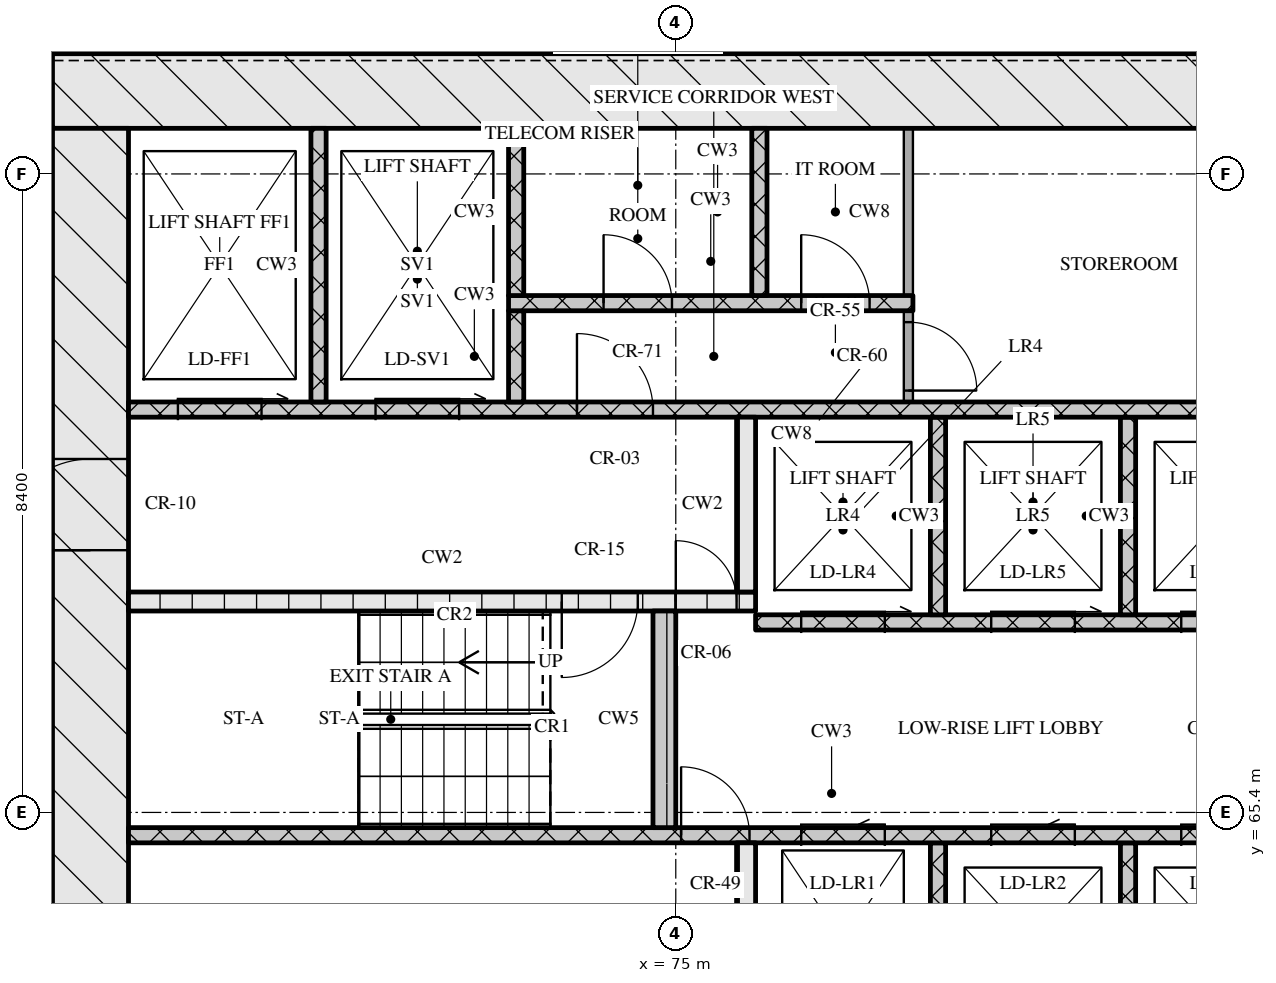
"""IFC4 building model, lengths in metres.
Left out: names, types, materials, properties, quantities, classifications, styles, units other than length and angle.
Written with IfcOpenShell. Run it as: python <this file> out.ifc"""

import sys

from ifc_helpers import new_model, si_unit, direction, frame, frame_2d, origin, place, context, subcontext, project, spatial, rectangle, extrude, element, fill, save


model = new_model("IFC4")
c1 = context("Model", 3, precision=1e-05, world=origin(), true_north=direction((0.0, 1.0)))
c2 = subcontext(c1, "Body", "Model", "MODEL_VIEW")
j1 = project(units=[si_unit("LENGTHUNIT", "METRE"), si_unit("PLANEANGLEUNIT", "RADIAN")], contexts=[c1])
p1 = place(None, origin())
s1 = spatial("IfcSite", under=j1, at=p1, CompositionType="ELEMENT")
p2 = place(p1, origin())
s2 = spatial("IfcBuilding", under=s1, at=p2, CompositionType="ELEMENT")
p3 = place(p2, frame((0.0, 0.0, 131.25)))
s3 = spatial("IfcBuildingStorey", under=s2, at=p3, CompositionType="ELEMENT", Elevation=131.25)
p4 = place(p3, frame((66.8, 74.9, 0.0), z_axis=(0.0, 0.0, 1.0), x_axis=(1.0, 0.0, 0.0)))
e1 = element("IfcWall", 1, at=p4, inside=s3, PredefinedType="SOLIDWALL", context=c2, shape_type="SweptSolid", body=[
    extrude(rectangle(XDim=41.6, YDim=1.0, at=frame_2d((20.8, 0.0))), origin(), (0.0, 0.0, 1.0), 3.32),
])
p5 = place(p3, frame((67.3, 62.4, 0.0), z_axis=(0.0, 0.0, 1.0), x_axis=(0.0, 1.0, 0.0)))
e2 = element("IfcWall", 2, at=p5, inside=s3, PredefinedType="SOLIDWALL", context=c2, shape_type="SweptSolid", body=[
    extrude(rectangle(XDim=12.0, YDim=1.0, at=frame_2d((6.0, 0.0))), origin(), (0.0, 0.0, 1.0), 3.32),
])
p6 = place(p5, frame((6.45, 0.0, 0.0)))
e3 = element("IfcOpeningElement", 3, at=p6, cuts=e2, PredefinedType="OPENING", context=c2, shape_type="SweptSolid", body=[
    extrude(rectangle(XDim=1.2, YDim=2.1, at=frame_2d((0.6, 1.05))), frame((0.0, 0.51, 0.0), z_axis=(0.0, -1.0, 0.0), x_axis=(1.0, 0.0, 0.0)), (0.0, 0.0, 1.0), 1.02),
])
p7 = place(p3, frame((75.925, 62.4, 0.0), z_axis=(0.0, 0.0, 1.0), x_axis=(0.0, 1.0, 0.0)))
e4 = element("IfcWall", 4, at=p7, inside=s3, PredefinedType="SOLIDWALL", context=c2, shape_type="SweptSolid", body=[
    extrude(rectangle(XDim=2.6, YDim=0.25, at=frame_2d((1.3, 0.0))), origin(), (0.0, 0.0, 1.0), 3.32),
])
for number, where, z_axis, x_axis in (
    (5, (78.45, 62.4, 0.0), (0.0, 0.0, 1.0), (0.0, 1.0, 0.0)),
    (6, (80.95, 62.4, 0.0), (0.0, 0.0, 1.0), (0.0, 1.0, 0.0)),
):
    element("IfcWall", number, at=place(p3, frame(where, z_axis=z_axis, x_axis=x_axis)), inside=s3, PredefinedType="SOLIDWALL", context=c2, shape_type="SweptSolid", body=[
        extrude(rectangle(XDim=2.6, YDim=0.2, at=frame_2d((1.3, 0.0))), origin(), (0.0, 0.0, 1.0), 3.32),
    ])
p8 = place(p3, frame((67.8, 65.1, 0.0), z_axis=(0.0, 0.0, 1.0), x_axis=(1.0, 0.0, 0.0)))
e7 = element("IfcWall", 7, at=p8, inside=s3, PredefinedType="SOLIDWALL", context=c2, shape_type="SweptSolid", body=[
    extrude(rectangle(XDim=18.5, YDim=0.2, at=frame_2d((9.25, 0.0))), origin(), (0.0, 0.0, 1.0), 3.32),
])
p9 = place(p8, frame((7.27, 0.0, 0.0)))
e8 = element("IfcOpeningElement", 8, at=p9, cuts=e7, PredefinedType="OPENING", context=c2, shape_type="SweptSolid", body=[
    extrude(rectangle(XDim=0.9, YDim=2.1, at=frame_2d((0.45, 1.05))), frame((0.0, 0.11, 0.0), z_axis=(0.0, -1.0, 0.0), x_axis=(1.0, 0.0, 0.0)), (0.0, 0.0, 1.0), 0.22),
])
p10 = place(p8, frame((8.85, 0.0, 0.0)))
e9 = element("IfcOpeningElement", 9, at=p10, cuts=e7, PredefinedType="OPENING", context=c2, shape_type="SweptSolid", body=[
    extrude(rectangle(XDim=1.1, YDim=2.1, at=frame_2d((0.55, 1.05))), frame((0.0, 0.11, 0.0), z_axis=(0.0, -1.0, 0.0), x_axis=(1.0, 0.0, 0.0)), (0.0, 0.0, 1.0), 0.22),
])
p11 = place(p8, frame((11.35, 0.0, 0.0)))
e10 = element("IfcOpeningElement", 10, at=p11, cuts=e7, PredefinedType="OPENING", context=c2, shape_type="SweptSolid", body=[
    extrude(rectangle(XDim=1.1, YDim=2.1, at=frame_2d((0.55, 1.05))), frame((0.0, 0.11, 0.0), z_axis=(0.0, -1.0, 0.0), x_axis=(1.0, 0.0, 0.0)), (0.0, 0.0, 1.0), 0.22),
])
p12 = place(p8, frame((13.85, 0.0, 0.0)))
e11 = element("IfcOpeningElement", 11, at=p12, cuts=e7, PredefinedType="OPENING", context=c2, shape_type="SweptSolid", body=[
    extrude(rectangle(XDim=1.1, YDim=2.1, at=frame_2d((0.55, 1.05))), frame((0.0, 0.11, 0.0), z_axis=(0.0, -1.0, 0.0), x_axis=(1.0, 0.0, 0.0)), (0.0, 0.0, 1.0), 0.22),
])
p13 = place(p8, frame((16.7, 0.0, 0.0)))
e12 = element("IfcOpeningElement", 12, at=p13, cuts=e7, PredefinedType="OPENING", context=c2, shape_type="SweptSolid", body=[
    extrude(rectangle(XDim=0.9, YDim=2.1, at=frame_2d((0.45, 1.05))), frame((0.0, 0.11, 0.0), z_axis=(0.0, -1.0, 0.0), x_axis=(1.0, 0.0, 0.0)), (0.0, 0.0, 1.0), 0.22),
])
p14 = place(p3, frame((74.85, 65.2, 0.0), z_axis=(0.0, 0.0, 1.0), x_axis=(0.0, 1.0, 0.0)))
e13 = element("IfcWall", 13, at=p14, inside=s3, PredefinedType="SOLIDWALL", context=c2, shape_type="SweptSolid", body=[
    extrude(rectangle(XDim=2.85, YDim=0.3, at=frame_2d((1.425, 0.0))), origin(), (0.0, 0.0, 1.0), 3.32),
])
p15 = place(p3, frame((76.05, 67.9, 0.0), z_axis=(0.0, 0.0, 1.0), x_axis=(1.0, 0.0, 0.0)))
e14 = element("IfcWall", 14, at=p15, inside=s3, PredefinedType="SOLIDWALL", context=c2, shape_type="SweptSolid", body=[
    extrude(rectangle(XDim=23.1, YDim=0.2, at=frame_2d((11.55, 0.0))), origin(), (0.0, 0.0, 1.0), 3.32),
])
p16 = place(p15, frame((0.6, 0.0, 0.0)))
e15 = element("IfcOpeningElement", 15, at=p16, cuts=e14, PredefinedType="OPENING", context=c2, shape_type="SweptSolid", body=[
    extrude(rectangle(XDim=1.1, YDim=2.1, at=frame_2d((0.55, 1.05))), frame((0.0, 0.11, 0.0), z_axis=(0.0, -1.0, 0.0), x_axis=(1.0, 0.0, 0.0)), (0.0, 0.0, 1.0), 0.22),
])
p17 = place(p15, frame((3.1, 0.0, 0.0)))
e16 = element("IfcOpeningElement", 16, at=p17, cuts=e14, PredefinedType="OPENING", context=c2, shape_type="SweptSolid", body=[
    extrude(rectangle(XDim=1.1, YDim=2.1, at=frame_2d((0.55, 1.05))), frame((0.0, 0.11, 0.0), z_axis=(0.0, -1.0, 0.0), x_axis=(1.0, 0.0, 0.0)), (0.0, 0.0, 1.0), 0.22),
])
p18 = place(p15, frame((5.6, 0.0, 0.0)))
e17 = element("IfcOpeningElement", 17, at=p18, cuts=e14, PredefinedType="OPENING", context=c2, shape_type="SweptSolid", body=[
    extrude(rectangle(XDim=1.1, YDim=2.1, at=frame_2d((0.55, 1.05))), frame((0.0, 0.11, 0.0), z_axis=(0.0, -1.0, 0.0), x_axis=(1.0, 0.0, 0.0)), (0.0, 0.0, 1.0), 0.22),
])
p19 = place(p15, frame((8.45, 0.0, 0.0)))
e18 = element("IfcOpeningElement", 18, at=p19, cuts=e14, PredefinedType="OPENING", context=c2, shape_type="SweptSolid", body=[
    extrude(rectangle(XDim=0.9, YDim=2.1, at=frame_2d((0.45, 1.05))), frame((0.0, 0.11, 0.0), z_axis=(0.0, -1.0, 0.0), x_axis=(1.0, 0.0, 0.0)), (0.0, 0.0, 1.0), 0.22),
])
p20 = place(p15, frame((10.91, 0.0, 0.0)))
e19 = element("IfcOpeningElement", 19, at=p20, cuts=e14, PredefinedType="OPENING", context=c2, shape_type="SweptSolid", body=[
    extrude(rectangle(XDim=0.9, YDim=2.1, at=frame_2d((0.45, 1.05))), frame((0.0, 0.11, 0.0), z_axis=(0.0, -1.0, 0.0), x_axis=(1.0, 0.0, 0.0)), (0.0, 0.0, 1.0), 0.22),
])
p21 = place(p15, frame((13.55, 0.0, 0.0)))
e20 = element("IfcOpeningElement", 20, at=p21, cuts=e14, PredefinedType="OPENING", context=c2, shape_type="SweptSolid", body=[
    extrude(rectangle(XDim=1.0, YDim=2.1, at=frame_2d((0.5, 1.05))), frame((0.0, 0.11, 0.0), z_axis=(0.0, -1.0, 0.0), x_axis=(1.0, 0.0, 0.0)), (0.0, 0.0, 1.0), 0.22),
])
for number, where, z_axis, x_axis in (
    (21, (78.45, 68.0, 0.0), (0.0, 0.0, 1.0), (0.0, 1.0, 0.0)),
    (22, (80.95, 68.0, 0.0), (0.0, 0.0, 1.0), (0.0, 1.0, 0.0)),
):
    element("IfcWall", number, at=place(p3, frame(where, z_axis=z_axis, x_axis=x_axis)), inside=s3, PredefinedType="SOLIDWALL", context=c2, shape_type="SweptSolid", body=[
        extrude(rectangle(XDim=2.6, YDim=0.2, at=frame_2d((1.3, 0.0))), origin(), (0.0, 0.0, 1.0), 3.32),
    ])
p22 = place(p3, frame((67.8, 68.175, 0.0), z_axis=(0.0, 0.0, 1.0), x_axis=(1.0, 0.0, 0.0)))
e23 = element("IfcWall", 23, at=p22, inside=s3, PredefinedType="SOLIDWALL", context=c2, shape_type="SweptSolid", body=[
    extrude(rectangle(XDim=8.25, YDim=0.25, at=frame_2d((4.125, 0.0))), origin(), (0.0, 0.0, 1.0), 3.32),
])
p23 = place(p22, frame((5.7, 0.0, 0.0)))
e24 = element("IfcOpeningElement", 24, at=p23, cuts=e23, PredefinedType="OPENING", context=c2, shape_type="SweptSolid", body=[
    extrude(rectangle(XDim=1.0, YDim=2.1, at=frame_2d((0.5, 1.05))), frame((0.0, 0.135, 0.0), z_axis=(0.0, -1.0, 0.0), x_axis=(1.0, 0.0, 0.0)), (0.0, 0.0, 1.0), 0.27),
])
p24 = place(p22, frame((7.2, 0.0, 0.0)))
e25 = element("IfcOpeningElement", 25, at=p24, cuts=e23, PredefinedType="OPENING", context=c2, shape_type="SweptSolid", body=[
    extrude(rectangle(XDim=0.8, YDim=2.1, at=frame_2d((0.4, 1.05))), frame((0.0, 0.135, 0.0), z_axis=(0.0, -1.0, 0.0), x_axis=(1.0, 0.0, 0.0)), (0.0, 0.0, 1.0), 0.27),
])
p25 = place(p3, frame((75.925, 68.3, 0.0), z_axis=(0.0, 0.0, 1.0), x_axis=(0.0, 1.0, 0.0)))
e26 = element("IfcWall", 26, at=p25, inside=s3, PredefinedType="SOLIDWALL", context=c2, shape_type="SweptSolid", body=[
    extrude(rectangle(XDim=2.3, YDim=0.25, at=frame_2d((1.15, 0.0))), origin(), (0.0, 0.0, 1.0), 3.32),
])
p26 = place(p3, frame((67.8, 70.7, 0.0), z_axis=(0.0, 0.0, 1.0), x_axis=(1.0, 0.0, 0.0)))
e27 = element("IfcWall", 27, at=p26, inside=s3, PredefinedType="SOLIDWALL", context=c2, shape_type="SweptSolid", body=[
    extrude(rectangle(XDim=39.6, YDim=0.2, at=frame_2d((19.8, 0.0))), origin(), (0.0, 0.0, 1.0), 3.32),
])
p27 = place(p26, frame((0.65, 0.0, 0.0)))
e28 = element("IfcOpeningElement", 28, at=p27, cuts=e27, PredefinedType="OPENING", context=c2, shape_type="SweptSolid", body=[
    extrude(rectangle(XDim=1.1, YDim=2.1, at=frame_2d((0.55, 1.05))), frame((0.0, 0.11, 0.0), z_axis=(0.0, -1.0, 0.0), x_axis=(1.0, 0.0, 0.0)), (0.0, 0.0, 1.0), 0.22),
])
p28 = place(p26, frame((3.25, 0.0, 0.0)))
e29 = element("IfcOpeningElement", 29, at=p28, cuts=e27, PredefinedType="OPENING", context=c2, shape_type="SweptSolid", body=[
    extrude(rectangle(XDim=1.1, YDim=2.1, at=frame_2d((0.55, 1.05))), frame((0.0, 0.11, 0.0), z_axis=(0.0, -1.0, 0.0), x_axis=(1.0, 0.0, 0.0)), (0.0, 0.0, 1.0), 0.22),
])
p29 = place(p26, frame((5.9, 0.0, 0.0)))
e30 = element("IfcOpeningElement", 30, at=p29, cuts=e27, PredefinedType="OPENING", context=c2, shape_type="SweptSolid", body=[
    extrude(rectangle(XDim=1.0, YDim=2.1, at=frame_2d((0.5, 1.05))), frame((0.0, 0.11, 0.0), z_axis=(0.0, -1.0, 0.0), x_axis=(1.0, 0.0, 0.0)), (0.0, 0.0, 1.0), 0.22),
])
p30 = place(p26, frame((21.7, 0.0, 0.0)))
e31 = element("IfcOpeningElement", 31, at=p30, cuts=e27, PredefinedType="OPENING", context=c2, shape_type="SweptSolid", body=[
    extrude(rectangle(XDim=1.0, YDim=2.1, at=frame_2d((0.5, 1.05))), frame((0.0, 0.11, 0.0), z_axis=(0.0, -1.0, 0.0), x_axis=(1.0, 0.0, 0.0)), (0.0, 0.0, 1.0), 0.22),
])
p31 = place(p26, frame((32.7, 0.0, 0.0)))
e32 = element("IfcOpeningElement", 32, at=p31, cuts=e27, PredefinedType="OPENING", context=c2, shape_type="SweptSolid", body=[
    extrude(rectangle(XDim=1.0, YDim=2.1, at=frame_2d((0.5, 1.05))), frame((0.0, 0.11, 0.0), z_axis=(0.0, -1.0, 0.0), x_axis=(1.0, 0.0, 0.0)), (0.0, 0.0, 1.0), 0.22),
])
p32 = place(p26, frame((35.25, 0.0, 0.0)))
e33 = element("IfcOpeningElement", 33, at=p32, cuts=e27, PredefinedType="OPENING", context=c2, shape_type="SweptSolid", body=[
    extrude(rectangle(XDim=1.1, YDim=2.1, at=frame_2d((0.55, 1.05))), frame((0.0, 0.11, 0.0), z_axis=(0.0, -1.0, 0.0), x_axis=(1.0, 0.0, 0.0)), (0.0, 0.0, 1.0), 0.22),
])
p33 = place(p26, frame((37.85, 0.0, 0.0)))
e34 = element("IfcOpeningElement", 34, at=p33, cuts=e27, PredefinedType="OPENING", context=c2, shape_type="SweptSolid", body=[
    extrude(rectangle(XDim=1.1, YDim=2.1, at=frame_2d((0.55, 1.05))), frame((0.0, 0.11, 0.0), z_axis=(0.0, -1.0, 0.0), x_axis=(1.0, 0.0, 0.0)), (0.0, 0.0, 1.0), 0.22),
])
p34 = place(p3, frame((70.3, 70.8, 0.0), z_axis=(0.0, 0.0, 1.0), x_axis=(0.0, 1.0, 0.0)))
e35 = element("IfcWall", 35, at=p34, inside=s3, PredefinedType="SOLIDWALL", context=c2, shape_type="SweptSolid", body=[
    extrude(rectangle(XDim=3.6, YDim=0.2, at=frame_2d((1.8, 0.0))), origin(), (0.0, 0.0, 1.0), 3.32),
])
p35 = place(p3, frame((72.9, 70.8, 0.0), z_axis=(0.0, 0.0, 1.0), x_axis=(0.0, 1.0, 0.0)))
e36 = element("IfcWall", 36, at=p35, inside=s3, PredefinedType="SOLIDWALL", context=c2, shape_type="SweptSolid", body=[
    extrude(rectangle(XDim=1.2, YDim=0.2, at=frame_2d((0.6, 0.0))), origin(), (0.0, 0.0, 1.0), 3.32),
])
p36 = place(p3, frame((78.06, 70.8, 0.0), z_axis=(0.0, 0.0, 1.0), x_axis=(0.0, 1.0, 0.0)))
e37 = element("IfcWall", 37, at=p36, inside=s3, PredefinedType="PARTITIONING", context=c2, shape_type="SweptSolid", body=[
    extrude(rectangle(XDim=1.2, YDim=0.12, at=frame_2d((0.6, 0.0))), origin(), (0.0, 0.0, 1.0), 3.32),
])
p37 = place(p36, frame((0.15, 0.0, 0.0)))
e38 = element("IfcOpeningElement", 38, at=p37, cuts=e37, PredefinedType="OPENING", context=c2, shape_type="SweptSolid", body=[
    extrude(rectangle(XDim=0.9, YDim=2.1, at=frame_2d((0.45, 1.05))), frame((0.0, 0.07, 0.0), z_axis=(0.0, -1.0, 0.0), x_axis=(1.0, 0.0, 0.0)), (0.0, 0.0, 1.0), 0.14),
])
p38 = place(p3, frame((72.8, 72.1, 0.0), z_axis=(0.0, 0.0, 1.0), x_axis=(1.0, 0.0, 0.0)))
e39 = element("IfcWall", 39, at=p38, inside=s3, PredefinedType="SOLIDWALL", context=c2, shape_type="SweptSolid", body=[
    extrude(rectangle(XDim=5.32, YDim=0.2, at=frame_2d((2.66, 0.0))), origin(), (0.0, 0.0, 1.0), 3.32),
])
p39 = place(p38, frame((1.25, 0.0, 0.0)))
e40 = element("IfcOpeningElement", 40, at=p39, cuts=e39, PredefinedType="OPENING", context=c2, shape_type="SweptSolid", body=[
    extrude(rectangle(XDim=0.9, YDim=2.1, at=frame_2d((0.45, 1.05))), frame((0.0, 0.11, 0.0), z_axis=(0.0, -1.0, 0.0), x_axis=(1.0, 0.0, 0.0)), (0.0, 0.0, 1.0), 0.22),
])
p40 = place(p38, frame((3.85, 0.0, 0.0)))
e41 = element("IfcOpeningElement", 41, at=p40, cuts=e39, PredefinedType="OPENING", context=c2, shape_type="SweptSolid", body=[
    extrude(rectangle(XDim=0.9, YDim=2.1, at=frame_2d((0.45, 1.05))), frame((0.0, 0.11, 0.0), z_axis=(0.0, -1.0, 0.0), x_axis=(1.0, 0.0, 0.0)), (0.0, 0.0, 1.0), 0.22),
])
for number, where, z_axis, x_axis in (
    (42, (72.9, 72.2, 0.0), (0.0, 0.0, 1.0), (0.0, 1.0, 0.0)),
    (43, (76.1, 72.2, 0.0), (0.0, 0.0, 1.0), (0.0, 1.0, 0.0)),
):
    element("IfcWall", number, at=place(p3, frame(where, z_axis=z_axis, x_axis=x_axis)), inside=s3, PredefinedType="SOLIDWALL", context=c2, shape_type="SweptSolid", body=[
        extrude(rectangle(XDim=2.2, YDim=0.2, at=frame_2d((1.1, 0.0))), origin(), (0.0, 0.0, 1.0), 3.32),
    ])
p41 = place(p3, frame((78.06, 72.2, 0.0), z_axis=(0.0, 0.0, 1.0), x_axis=(0.0, 1.0, 0.0)))
e44 = element("IfcWall", 44, at=p41, inside=s3, PredefinedType="PARTITIONING", context=c2, shape_type="SweptSolid", body=[
    extrude(rectangle(XDim=2.2, YDim=0.12, at=frame_2d((1.1, 0.0))), origin(), (0.0, 0.0, 1.0), 3.32),
])
p42 = place(p9, origin())
e45 = element("IfcDoor", 45, at=p42, inside=s3, OperationType="SINGLE_SWING_LEFT", PredefinedType="DOOR", context=c2, shape_type="SweptSolid", body=[
    extrude(rectangle(XDim=0.9, YDim=2.1, at=frame_2d((0.45, 1.05))), frame((0.0, 0.025, 0.0), z_axis=(0.0, -1.0, 0.0), x_axis=(1.0, 0.0, 0.0)), (0.0, 0.0, 1.0), 0.05),
])
fill(e8, e45)
p43 = place(p10, origin())
e46 = element("IfcDoor", 46, at=p43, inside=s3, OperationType="SLIDING_TO_LEFT", PredefinedType="DOOR", context=c2, shape_type="SweptSolid", body=[
    extrude(rectangle(XDim=1.1, YDim=2.1, at=frame_2d((0.55, 1.05))), frame((0.0, 0.025, 0.0), z_axis=(0.0, -1.0, 0.0), x_axis=(1.0, 0.0, 0.0)), (0.0, 0.0, 1.0), 0.05),
])
fill(e9, e46)
p44 = place(p11, origin())
e47 = element("IfcDoor", 47, at=p44, inside=s3, OperationType="SLIDING_TO_LEFT", PredefinedType="DOOR", context=c2, shape_type="SweptSolid", body=[
    extrude(rectangle(XDim=1.1, YDim=2.1, at=frame_2d((0.55, 1.05))), frame((0.0, 0.025, 0.0), z_axis=(0.0, -1.0, 0.0), x_axis=(1.0, 0.0, 0.0)), (0.0, 0.0, 1.0), 0.05),
])
fill(e10, e47)
p45 = place(p12, origin())
e48 = element("IfcDoor", 48, at=p45, inside=s3, OperationType="SLIDING_TO_LEFT", PredefinedType="DOOR", context=c2, shape_type="SweptSolid", body=[
    extrude(rectangle(XDim=1.1, YDim=2.1, at=frame_2d((0.55, 1.05))), frame((0.0, 0.025, 0.0), z_axis=(0.0, -1.0, 0.0), x_axis=(1.0, 0.0, 0.0)), (0.0, 0.0, 1.0), 0.05),
])
fill(e11, e48)
p46 = place(p16, origin())
e49 = element("IfcDoor", 49, at=p46, inside=s3, OperationType="SLIDING_TO_RIGHT", PredefinedType="DOOR", context=c2, shape_type="SweptSolid", body=[
    extrude(rectangle(XDim=1.1, YDim=2.1, at=frame_2d((0.55, 1.05))), frame((0.0, 0.025, 0.0), z_axis=(0.0, -1.0, 0.0), x_axis=(1.0, 0.0, 0.0)), (0.0, 0.0, 1.0), 0.05),
])
fill(e15, e49)
p47 = place(p17, origin())
e50 = element("IfcDoor", 50, at=p47, inside=s3, OperationType="SLIDING_TO_RIGHT", PredefinedType="DOOR", context=c2, shape_type="SweptSolid", body=[
    extrude(rectangle(XDim=1.1, YDim=2.1, at=frame_2d((0.55, 1.05))), frame((0.0, 0.025, 0.0), z_axis=(0.0, -1.0, 0.0), x_axis=(1.0, 0.0, 0.0)), (0.0, 0.0, 1.0), 0.05),
])
fill(e16, e50)
p48 = place(p18, origin())
e51 = element("IfcDoor", 51, at=p48, inside=s3, OperationType="SLIDING_TO_RIGHT", PredefinedType="DOOR", context=c2, shape_type="SweptSolid", body=[
    extrude(rectangle(XDim=1.1, YDim=2.1, at=frame_2d((0.55, 1.05))), frame((0.0, 0.025, 0.0), z_axis=(0.0, -1.0, 0.0), x_axis=(1.0, 0.0, 0.0)), (0.0, 0.0, 1.0), 0.05),
])
fill(e17, e51)
p49 = place(p23, origin())
e52 = element("IfcDoor", 52, at=p49, inside=s3, OperationType="SINGLE_SWING_RIGHT", PredefinedType="DOOR", context=c2, shape_type="SweptSolid", body=[
    extrude(rectangle(XDim=1.0, YDim=2.1, at=frame_2d((0.5, 1.05))), frame((0.0, 0.025, 0.0), z_axis=(0.0, -1.0, 0.0), x_axis=(1.0, 0.0, 0.0)), (0.0, 0.0, 1.0), 0.05),
])
fill(e24, e52)
p50 = place(p24, origin())
e53 = element("IfcDoor", 53, at=p50, inside=s3, OperationType="SINGLE_SWING_LEFT", PredefinedType="DOOR", context=c2, shape_type="SweptSolid", body=[
    extrude(rectangle(XDim=0.8, YDim=2.1, at=frame_2d((0.4, 1.05))), frame((0.0, 0.025, 0.0), z_axis=(0.0, -1.0, 0.0), x_axis=(1.0, 0.0, 0.0)), (0.0, 0.0, 1.0), 0.05),
])
fill(e25, e53)
p51 = place(p6, origin())
e54 = element("IfcDoor", 54, at=p51, inside=s3, OperationType="SINGLE_SWING_LEFT", PredefinedType="DOOR", context=c2, shape_type="SweptSolid", body=[
    extrude(rectangle(XDim=1.2, YDim=2.1, at=frame_2d((0.6, 1.05))), frame((0.0, 0.025, 0.0), z_axis=(0.0, -1.0, 0.0), x_axis=(1.0, 0.0, 0.0)), (0.0, 0.0, 1.0), 0.05),
])
fill(e3, e54)
p52 = place(p27, origin())
e55 = element("IfcDoor", 55, at=p52, inside=s3, OperationType="SLIDING_TO_RIGHT", PredefinedType="DOOR", context=c2, shape_type="SweptSolid", body=[
    extrude(rectangle(XDim=1.1, YDim=2.1, at=frame_2d((0.55, 1.05))), frame((0.0, 0.025, 0.0), z_axis=(0.0, -1.0, 0.0), x_axis=(1.0, 0.0, 0.0)), (0.0, 0.0, 1.0), 0.05),
])
fill(e28, e55)
p53 = place(p28, origin())
e56 = element("IfcDoor", 56, at=p53, inside=s3, OperationType="SLIDING_TO_RIGHT", PredefinedType="DOOR", context=c2, shape_type="SweptSolid", body=[
    extrude(rectangle(XDim=1.1, YDim=2.1, at=frame_2d((0.55, 1.05))), frame((0.0, 0.025, 0.0), z_axis=(0.0, -1.0, 0.0), x_axis=(1.0, 0.0, 0.0)), (0.0, 0.0, 1.0), 0.05),
])
fill(e29, e56)
p54 = place(p29, origin())
e57 = element("IfcDoor", 57, at=p54, inside=s3, OperationType="SINGLE_SWING_LEFT", PredefinedType="DOOR", context=c2, shape_type="SweptSolid", body=[
    extrude(rectangle(XDim=1.0, YDim=2.1, at=frame_2d((0.5, 1.05))), frame((0.0, 0.025, 0.0), z_axis=(0.0, -1.0, 0.0), x_axis=(1.0, 0.0, 0.0)), (0.0, 0.0, 1.0), 0.05),
])
fill(e30, e57)
p55 = place(p37, origin())
e58 = element("IfcDoor", 58, at=p55, inside=s3, OperationType="SINGLE_SWING_RIGHT", PredefinedType="DOOR", context=c2, shape_type="SweptSolid", body=[
    extrude(rectangle(XDim=0.9, YDim=2.1, at=frame_2d((0.45, 1.05))), frame((0.0, 0.025, 0.0), z_axis=(0.0, -1.0, 0.0), x_axis=(1.0, 0.0, 0.0)), (0.0, 0.0, 1.0), 0.05),
])
fill(e38, e58)
p56 = place(p39, origin())
e59 = element("IfcDoor", 59, at=p56, inside=s3, OperationType="SINGLE_SWING_LEFT", PredefinedType="DOOR", context=c2, shape_type="SweptSolid", body=[
    extrude(rectangle(XDim=0.9, YDim=2.1, at=frame_2d((0.45, 1.05))), frame((0.0, 0.025, 0.0), z_axis=(0.0, -1.0, 0.0), x_axis=(1.0, 0.0, 0.0)), (0.0, 0.0, 1.0), 0.05),
])
fill(e40, e59)
p57 = place(p40, origin())
e60 = element("IfcDoor", 60, at=p57, inside=s3, OperationType="SINGLE_SWING_LEFT", PredefinedType="DOOR", context=c2, shape_type="SweptSolid", body=[
    extrude(rectangle(XDim=0.9, YDim=2.1, at=frame_2d((0.45, 1.05))), frame((0.0, 0.025, 0.0), z_axis=(0.0, -1.0, 0.0), x_axis=(1.0, 0.0, 0.0)), (0.0, 0.0, 1.0), 0.05),
])
fill(e41, e60)
save(model, sys.argv[1])
